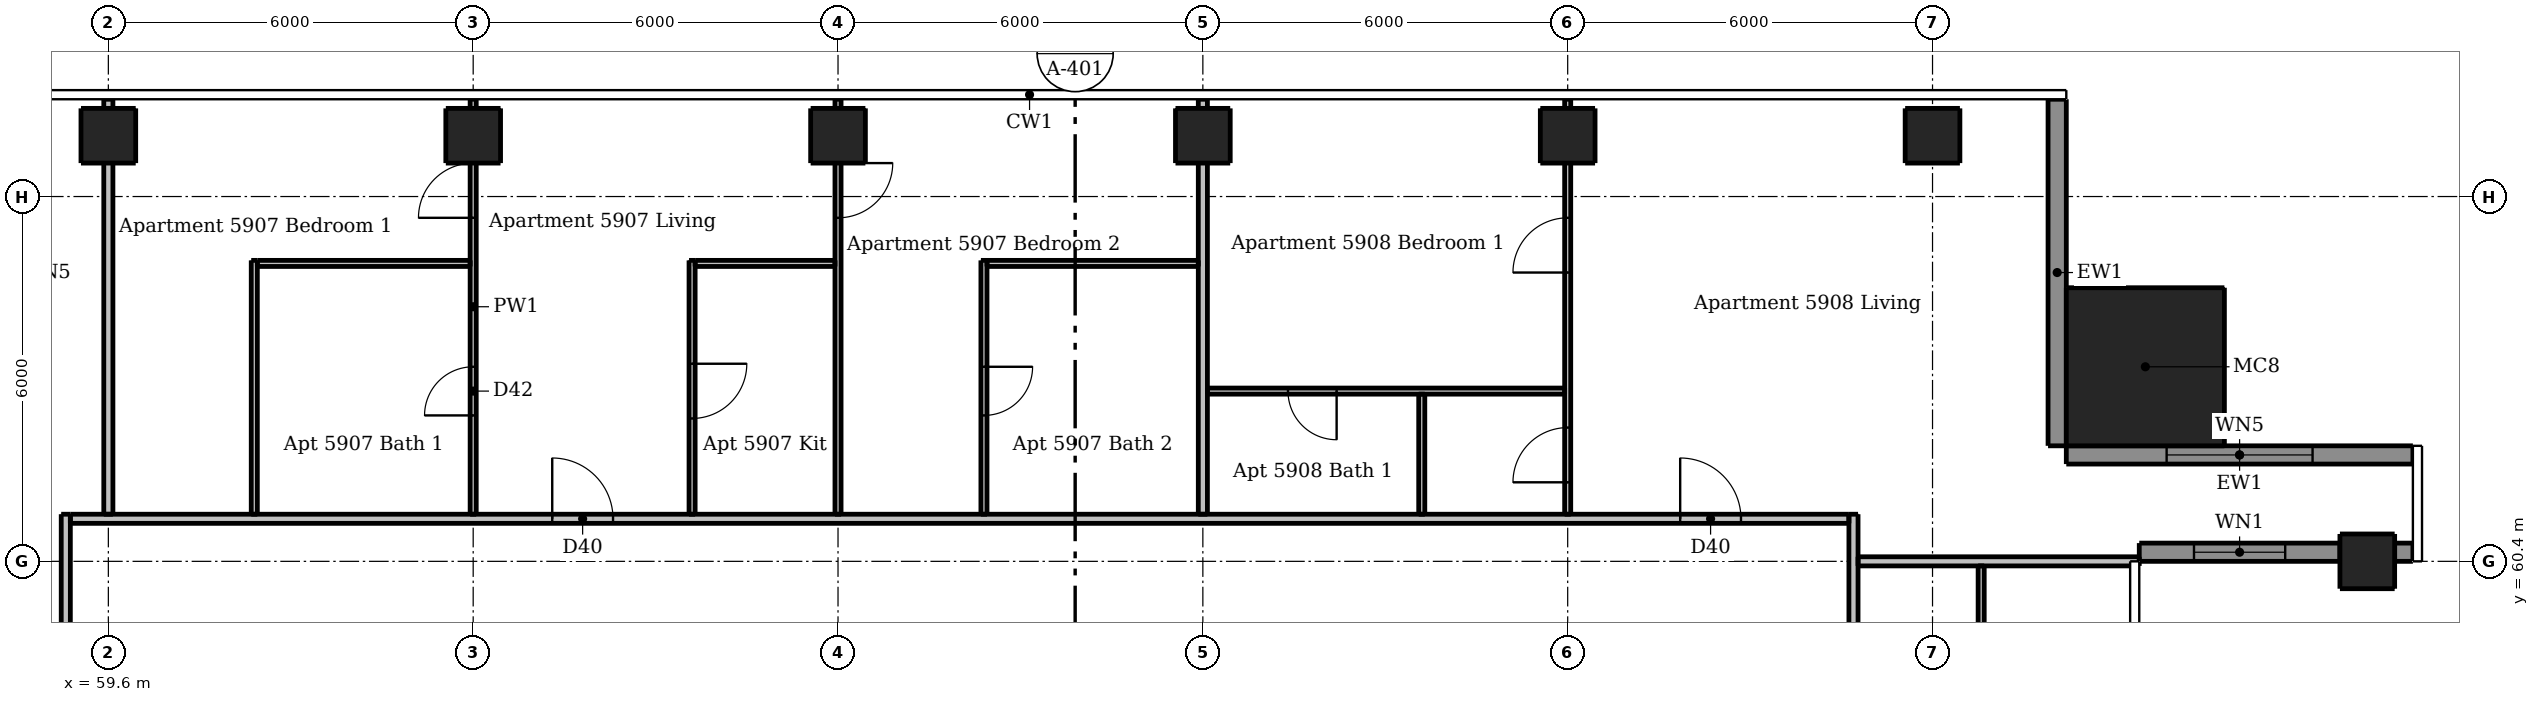
"""IFC4 building model, lengths in metres.
Left out: names, types, materials, properties, quantities, classifications, styles, units other than length and angle.
Written with IfcOpenShell. Run it as: python <this file> out.ifc"""

import sys

from ifc_helpers import new_model, si_unit, direction, frame, frame_2d, origin, origin_2d, place, context, subcontext, project, spatial, rectangle, extrude, element, fill, save


model = new_model("IFC4")
c1 = context("Model", 3, precision=1e-05, world=origin(), true_north=direction((0.0, 1.0)))
c2 = subcontext(c1, "Body", "Model", "MODEL_VIEW")
j1 = project(units=[si_unit("LENGTHUNIT", "METRE"), si_unit("PLANEANGLEUNIT", "RADIAN")], contexts=[c1])
p1 = place(None, origin())
s1 = spatial("IfcSite", under=j1, at=p1, CompositionType="ELEMENT")
p2 = place(p1, origin())
s2 = spatial("IfcBuilding", under=s1, at=p2, CompositionType="ELEMENT")
p3 = place(p2, frame((0.0, 0.0, 220.0)))
s3 = spatial("IfcBuildingStorey", under=s2, at=p3, CompositionType="ELEMENT", Elevation=220.0)
for number, where, z_axis, x_axis in (
    (1, (96.75, 60.4, 0.0), (0.0, 0.0, 1.0), (1.0, 0.0, 0.0)),
    (2, (59.6, 67.4, 0.0), (0.0, 0.0, 1.0), (1.0, 0.0, 0.0)),
    (3, (65.6, 67.4, 0.0), (0.0, 0.0, 1.0), (1.0, 0.0, 0.0)),
    (4, (71.6, 67.4, 0.0), (0.0, 0.0, 1.0), (1.0, 0.0, 0.0)),
    (5, (77.6, 67.4, 0.0), (0.0, 0.0, 1.0), (1.0, 0.0, 0.0)),
    (6, (83.6, 67.4, 0.0), (0.0, 0.0, 1.0), (1.0, 0.0, 0.0)),
    (7, (89.6, 67.4, 0.0), (0.0, 0.0, 1.0), (1.0, 0.0, 0.0)),
):
    element("IfcColumn", number, at=place(p3, frame(where, z_axis=z_axis, x_axis=x_axis)), inside=s3, PredefinedType="COLUMN", context=c2, shape_type="SweptSolid", body=[
        extrude(rectangle(XDim=0.9, YDim=0.9, at=origin_2d()), origin(), (0.0, 0.0, 1.0), 3.05),
    ])
p4 = place(p3, frame((93.1, 63.6, 0.0), z_axis=(0.0, 0.0, 1.0), x_axis=(1.0, 0.0, 0.0)))
e8 = element("IfcColumn", 8, at=p4, inside=s3, PredefinedType="COLUMN", context=c2, shape_type="SweptSolid", body=[
    extrude(rectangle(XDim=2.6, YDim=2.6, at=origin_2d()), origin(), (0.0, 0.0, 1.0), 3.3),
])
p5 = place(p3, frame((93.0, 60.55, 0.0), z_axis=(0.0, 0.0, 1.0), x_axis=(1.0, 0.0, 0.0)))
e9 = element("IfcWall", 9, at=p5, inside=s3, PredefinedType="SOLIDWALL", context=c2, shape_type="SweptSolid", body=[
    extrude(rectangle(XDim=3.3, YDim=0.3, at=frame_2d((1.65, 0.0))), origin(), (0.0, 0.0, 1.0), 3.05),
])
p6 = place(p5, frame((0.9, 0.0, 0.9)))
e10 = element("IfcOpeningElement", 10, at=p6, cuts=e9, PredefinedType="OPENING", context=c2, shape_type="SweptSolid", body=[
    extrude(rectangle(XDim=1.5, YDim=1.5, at=frame_2d((0.75, 0.75))), frame((0.0, 0.16, 0.0), z_axis=(0.0, -1.0, 0.0), x_axis=(1.0, 0.0, 0.0)), (0.0, 0.0, 1.0), 0.32),
])
p7 = place(p3, frame((97.2, 60.55, 0.0), z_axis=(0.0, 0.0, 1.0), x_axis=(1.0, 0.0, 0.0)))
e11 = element("IfcWall", 11, at=p7, inside=s3, PredefinedType="SOLIDWALL", context=c2, shape_type="SweptSolid", body=[
    extrude(rectangle(XDim=0.3, YDim=0.3, at=frame_2d((0.15, 0.0))), origin(), (0.0, 0.0, 1.0), 3.05),
])
p8 = place(p3, frame((97.5, 62.15, 0.0), z_axis=(0.0, 0.0, 1.0), x_axis=(-1.0, 0.0, 0.0)))
e12 = element("IfcWall", 12, at=p8, inside=s3, PredefinedType="SOLIDWALL", context=c2, shape_type="SweptSolid", body=[
    extrude(rectangle(XDim=5.7, YDim=0.3, at=frame_2d((2.85, 0.0))), origin(), (0.0, 0.0, 1.0), 3.05),
])
p9 = place(p8, frame((1.65, 0.0, 0.15)))
e13 = element("IfcOpeningElement", 13, at=p9, cuts=e12, PredefinedType="OPENING", context=c2, shape_type="SweptSolid", body=[
    extrude(rectangle(XDim=2.4, YDim=2.1, at=frame_2d((1.2, 1.05))), frame((0.0, 0.16, 0.0), z_axis=(0.0, -1.0, 0.0), x_axis=(1.0, 0.0, 0.0)), (0.0, 0.0, 1.0), 0.32),
])
p10 = place(p3, frame((91.65, 62.3, 0.0), z_axis=(0.0, 0.0, 1.0), x_axis=(0.0, 1.0, 0.0)))
e14 = element("IfcWall", 14, at=p10, inside=s3, PredefinedType="SOLIDWALL", context=c2, shape_type="SweptSolid", body=[
    extrude(rectangle(XDim=5.7, YDim=0.3, at=frame_2d((2.85, 0.0))), origin(), (0.0, 0.0, 1.0), 3.05),
])
p11 = place(p3, frame((62.0, 61.175, 0.0), z_axis=(0.0, 0.0, 1.0), x_axis=(0.0, 1.0, 0.0)))
e15 = element("IfcWall", 15, at=p11, inside=s3, PredefinedType="PARTITIONING", context=c2, shape_type="SweptSolid", body=[
    extrude(rectangle(XDim=4.175, YDim=0.1, at=frame_2d((2.087, 0.0))), origin(), (0.0, 0.0, 1.0), 3.05),
])
p12 = place(p3, frame((65.6, 61.175, 0.0), z_axis=(0.0, 0.0, 1.0), x_axis=(0.0, 1.0, 0.0)))
e16 = element("IfcWall", 16, at=p12, inside=s3, PredefinedType="PARTITIONING", context=c2, shape_type="SweptSolid", body=[
    extrude(rectangle(XDim=6.825, YDim=0.1, at=frame_2d((3.413, 0.0))), origin(), (0.0, 0.0, 1.0), 2.516),
])
p13 = place(p12, frame((4.875, 0.0, 0.0)))
e17 = element("IfcOpeningElement", 17, at=p13, cuts=e16, PredefinedType="OPENING", context=c2, shape_type="SweptSolid", body=[
    extrude(rectangle(XDim=0.9, YDim=2.1, at=frame_2d((0.45, 1.05))), frame((0.0, 0.06, 0.0), z_axis=(0.0, -1.0, 0.0), x_axis=(1.0, 0.0, 0.0)), (0.0, 0.0, 1.0), 0.12),
])
p14 = place(p12, frame((1.625, 0.0, 0.0)))
e18 = element("IfcOpeningElement", 18, at=p14, cuts=e16, PredefinedType="OPENING", context=c2, shape_type="SweptSolid", body=[
    extrude(rectangle(XDim=0.8, YDim=2.1, at=frame_2d((0.4, 1.05))), frame((0.0, 0.06, 0.0), z_axis=(0.0, -1.0, 0.0), x_axis=(1.0, 0.0, 0.0)), (0.0, 0.0, 1.0), 0.12),
])
p15 = place(p3, frame((69.2, 65.35, 0.0), z_axis=(0.0, 0.0, 1.0), x_axis=(0.0, -1.0, 0.0)))
e19 = element("IfcWall", 19, at=p15, inside=s3, PredefinedType="PARTITIONING", context=c2, shape_type="SweptSolid", body=[
    extrude(rectangle(XDim=4.175, YDim=0.1, at=frame_2d((2.087, 0.0))), origin(), (0.0, 0.0, 1.0), 3.05),
])
p16 = place(p15, frame((1.7, 0.0, 0.0)))
e20 = element("IfcOpeningElement", 20, at=p16, cuts=e19, PredefinedType="OPENING", context=c2, shape_type="SweptSolid", body=[
    extrude(rectangle(XDim=0.9, YDim=2.1, at=frame_2d((0.45, 1.05))), frame((0.0, 0.06, 0.0), z_axis=(0.0, -1.0, 0.0), x_axis=(1.0, 0.0, 0.0)), (0.0, 0.0, 1.0), 0.12),
])
p17 = place(p3, frame((71.6, 68.0, 0.0), z_axis=(0.0, 0.0, 1.0), x_axis=(0.0, -1.0, 0.0)))
e21 = element("IfcWall", 21, at=p17, inside=s3, PredefinedType="PARTITIONING", context=c2, shape_type="SweptSolid", body=[
    extrude(rectangle(XDim=6.825, YDim=0.1, at=frame_2d((3.413, 0.0))), origin(), (0.0, 0.0, 1.0), 2.516),
])
p18 = place(p17, frame((1.05, 0.0, 0.0)))
e22 = element("IfcOpeningElement", 22, at=p18, cuts=e21, PredefinedType="OPENING", context=c2, shape_type="SweptSolid", body=[
    extrude(rectangle(XDim=0.9, YDim=2.1, at=frame_2d((0.45, 1.05))), frame((0.0, 0.06, 0.0), z_axis=(0.0, -1.0, 0.0), x_axis=(1.0, 0.0, 0.0)), (0.0, 0.0, 1.0), 0.12),
])
p19 = place(p3, frame((74.0, 65.35, 0.0), z_axis=(0.0, 0.0, 1.0), x_axis=(0.0, -1.0, 0.0)))
e23 = element("IfcWall", 23, at=p19, inside=s3, PredefinedType="PARTITIONING", context=c2, shape_type="SweptSolid", body=[
    extrude(rectangle(XDim=4.175, YDim=0.1, at=frame_2d((2.087, 0.0))), origin(), (0.0, 0.0, 1.0), 3.05),
])
p20 = place(p19, frame((1.75, 0.0, 0.0)))
e24 = element("IfcOpeningElement", 24, at=p20, cuts=e23, PredefinedType="OPENING", context=c2, shape_type="SweptSolid", body=[
    extrude(rectangle(XDim=0.8, YDim=2.1, at=frame_2d((0.4, 1.05))), frame((0.0, 0.06, 0.0), z_axis=(0.0, -1.0, 0.0), x_axis=(1.0, 0.0, 0.0)), (0.0, 0.0, 1.0), 0.12),
])
p21 = place(p3, frame((81.2, 61.175, 0.0), z_axis=(0.0, 0.0, 1.0), x_axis=(0.0, 1.0, 0.0)))
e25 = element("IfcWall", 25, at=p21, inside=s3, PredefinedType="PARTITIONING", context=c2, shape_type="SweptSolid", body=[
    extrude(rectangle(XDim=1.975, YDim=0.1, at=frame_2d((0.987, 0.0))), origin(), (0.0, 0.0, 1.0), 3.05),
])
p22 = place(p3, frame((83.6, 61.175, 0.0), z_axis=(0.0, 0.0, 1.0), x_axis=(0.0, 1.0, 0.0)))
e26 = element("IfcWall", 26, at=p22, inside=s3, PredefinedType="PARTITIONING", context=c2, shape_type="SweptSolid", body=[
    extrude(rectangle(XDim=6.825, YDim=0.1, at=frame_2d((3.413, 0.0))), origin(), (0.0, 0.0, 1.0), 2.516),
])
p23 = place(p22, frame((0.525, 0.0, 0.0)))
e27 = element("IfcOpeningElement", 27, at=p23, cuts=e26, PredefinedType="OPENING", context=c2, shape_type="SweptSolid", body=[
    extrude(rectangle(XDim=0.9, YDim=2.1, at=frame_2d((0.45, 1.05))), frame((0.0, 0.06, 0.0), z_axis=(0.0, -1.0, 0.0), x_axis=(1.0, 0.0, 0.0)), (0.0, 0.0, 1.0), 0.12),
])
p24 = place(p22, frame((3.975, 0.0, 0.0)))
e28 = element("IfcOpeningElement", 28, at=p24, cuts=e26, PredefinedType="OPENING", context=c2, shape_type="SweptSolid", body=[
    extrude(rectangle(XDim=0.9, YDim=2.1, at=frame_2d((0.45, 1.05))), frame((0.0, 0.06, 0.0), z_axis=(0.0, -1.0, 0.0), x_axis=(1.0, 0.0, 0.0)), (0.0, 0.0, 1.0), 0.12),
])
p25 = place(p3, frame((90.4, 57.45, 0.0), z_axis=(0.0, 0.0, 1.0), x_axis=(0.0, 1.0, 0.0)))
e29 = element("IfcWall", 29, at=p25, inside=s3, PredefinedType="PARTITIONING", context=c2, shape_type="SweptSolid", body=[
    extrude(rectangle(XDim=2.875, YDim=0.1, at=frame_2d((1.438, 0.0))), origin(), (0.0, 0.0, 1.0), 3.05),
])
p26 = place(p3, frame((62.05, 65.3, 0.0), z_axis=(0.0, 0.0, 1.0), x_axis=(1.0, 0.0, 0.0)))
e30 = element("IfcWall", 30, at=p26, inside=s3, PredefinedType="PARTITIONING", context=c2, shape_type="SweptSolid", body=[
    extrude(rectangle(XDim=3.5, YDim=0.1, at=frame_2d((1.75, 0.0))), origin(), (0.0, 0.0, 1.0), 3.05),
])
p27 = place(p3, frame((69.25, 65.3, 0.0), z_axis=(0.0, 0.0, 1.0), x_axis=(1.0, 0.0, 0.0)))
e31 = element("IfcWall", 31, at=p27, inside=s3, PredefinedType="PARTITIONING", context=c2, shape_type="SweptSolid", body=[
    extrude(rectangle(XDim=2.3, YDim=0.1, at=frame_2d((1.15, 0.0))), origin(), (0.0, 0.0, 1.0), 3.05),
])
p28 = place(p3, frame((74.05, 65.3, 0.0), z_axis=(0.0, 0.0, 1.0), x_axis=(1.0, 0.0, 0.0)))
e32 = element("IfcWall", 32, at=p28, inside=s3, PredefinedType="PARTITIONING", context=c2, shape_type="SweptSolid", body=[
    extrude(rectangle(XDim=3.475, YDim=0.1, at=frame_2d((1.737, 0.0))), origin(), (0.0, 0.0, 1.0), 3.05),
])
p29 = place(p3, frame((83.55, 63.2, 0.0), z_axis=(0.0, 0.0, 1.0), x_axis=(-1.0, 0.0, 0.0)))
e33 = element("IfcWall", 33, at=p29, inside=s3, PredefinedType="PARTITIONING", context=c2, shape_type="SweptSolid", body=[
    extrude(rectangle(XDim=5.875, YDim=0.1, at=frame_2d((2.938, 0.0))), origin(), (0.0, 0.0, 1.0), 3.05),
])
p30 = place(p29, frame((3.75, 0.0, 0.0)))
e34 = element("IfcOpeningElement", 34, at=p30, cuts=e33, PredefinedType="OPENING", context=c2, shape_type="SweptSolid", body=[
    extrude(rectangle(XDim=0.8, YDim=2.1, at=frame_2d((0.4, 1.05))), frame((0.0, 0.06, 0.0), z_axis=(0.0, -1.0, 0.0), x_axis=(1.0, 0.0, 0.0)), (0.0, 0.0, 1.0), 0.12),
])
p31 = place(p3, frame((58.9, 30.325, 0.0), z_axis=(0.0, 0.0, 1.0), x_axis=(0.0, 1.0, 0.0)))
e35 = element("IfcWall", 35, at=p31, inside=s3, PredefinedType="PARTITIONING", context=c2, shape_type="SweptSolid", body=[
    extrude(rectangle(XDim=30.85, YDim=0.15, at=frame_2d((15.425, 0.0))), origin(), (0.0, 0.0, 1.0), 3.05),
])
p32 = place(p31, frame((7.375, 0.0, 0.0)))
e36 = element("IfcOpeningElement", 36, at=p32, cuts=e35, PredefinedType="OPENING", context=c2, shape_type="SweptSolid", body=[
    extrude(rectangle(XDim=1.0, YDim=2.1, at=frame_2d((0.5, 1.05))), frame((0.0, 0.085, 0.0), z_axis=(0.0, -1.0, 0.0), x_axis=(1.0, 0.0, 0.0)), (0.0, 0.0, 1.0), 0.17),
])
p33 = place(p31, frame((26.925, 0.0, 0.0)))
e37 = element("IfcOpeningElement", 37, at=p33, cuts=e35, PredefinedType="OPENING", context=c2, shape_type="SweptSolid", body=[
    extrude(rectangle(XDim=1.0, YDim=2.1, at=frame_2d((0.5, 1.05))), frame((0.0, 0.085, 0.0), z_axis=(0.0, -1.0, 0.0), x_axis=(1.0, 0.0, 0.0)), (0.0, 0.0, 1.0), 0.17),
])
p34 = place(p3, frame((59.6, 61.175, 0.0), z_axis=(0.0, 0.0, 1.0), x_axis=(0.0, 1.0, 0.0)))
e38 = element("IfcWall", 38, at=p34, inside=s3, PredefinedType="PARTITIONING", context=c2, shape_type="SweptSolid", body=[
    extrude(rectangle(XDim=6.825, YDim=0.15, at=frame_2d((3.413, 0.0))), origin(), (0.0, 0.0, 1.0), 2.51),
])
p35 = place(p3, frame((77.6, 61.175, 0.0), z_axis=(0.0, 0.0, 1.0), x_axis=(0.0, 1.0, 0.0)))
e39 = element("IfcWall", 39, at=p35, inside=s3, PredefinedType="PARTITIONING", context=c2, shape_type="SweptSolid", body=[
    extrude(rectangle(XDim=6.825, YDim=0.15, at=frame_2d((3.413, 0.0))), origin(), (0.0, 0.0, 1.0), 2.516),
])
p36 = place(p3, frame((88.3, 61.175, 0.0), z_axis=(0.0, 0.0, 1.0), x_axis=(0.0, -1.0, 0.0)))
e40 = element("IfcWall", 40, at=p36, inside=s3, PredefinedType="PARTITIONING", context=c2, shape_type="SweptSolid", body=[
    extrude(rectangle(XDim=29.4, YDim=0.15, at=frame_2d((14.7, 0.0))), origin(), (0.0, 0.0, 1.0), 3.05),
])
p37 = place(p36, frame((28.125, 0.0, 0.0)))
e41 = element("IfcOpeningElement", 41, at=p37, cuts=e40, PredefinedType="OPENING", context=c2, shape_type="SweptSolid", body=[
    extrude(rectangle(XDim=1.0, YDim=2.1, at=frame_2d((0.5, 1.05))), frame((0.0, 0.085, 0.0), z_axis=(0.0, -1.0, 0.0), x_axis=(1.0, 0.0, 0.0)), (0.0, 0.0, 1.0), 0.17),
])
p38 = place(p36, frame((15.275, 0.0, 0.0)))
e42 = element("IfcOpeningElement", 42, at=p38, cuts=e40, PredefinedType="OPENING", context=c2, shape_type="SweptSolid", body=[
    extrude(rectangle(XDim=1.0, YDim=2.1, at=frame_2d((0.5, 1.05))), frame((0.0, 0.085, 0.0), z_axis=(0.0, -1.0, 0.0), x_axis=(1.0, 0.0, 0.0)), (0.0, 0.0, 1.0), 0.17),
])
p39 = place(p36, frame((5.075, 0.0, 0.0)))
e43 = element("IfcOpeningElement", 43, at=p39, cuts=e40, PredefinedType="OPENING", context=c2, shape_type="SweptSolid", body=[
    extrude(rectangle(XDim=1.0, YDim=2.1, at=frame_2d((0.5, 1.05))), frame((0.0, 0.085, 0.0), z_axis=(0.0, -1.0, 0.0), x_axis=(1.0, 0.0, 0.0)), (0.0, 0.0, 1.0), 0.17),
])
p40 = place(p3, frame((58.975, 61.1, 0.0), z_axis=(0.0, 0.0, 1.0), x_axis=(1.0, 0.0, 0.0)))
e44 = element("IfcWall", 44, at=p40, inside=s3, PredefinedType="PARTITIONING", context=c2, shape_type="SweptSolid", body=[
    extrude(rectangle(XDim=29.25, YDim=0.15, at=frame_2d((14.625, 0.0))), origin(), (0.0, 0.0, 1.0), 3.05),
])
p41 = place(p40, frame((7.925, 0.0, 0.0)))
e45 = element("IfcOpeningElement", 45, at=p41, cuts=e44, PredefinedType="OPENING", context=c2, shape_type="SweptSolid", body=[
    extrude(rectangle(XDim=1.0, YDim=2.1, at=frame_2d((0.5, 1.05))), frame((0.0, 0.085, 0.0), z_axis=(0.0, -1.0, 0.0), x_axis=(1.0, 0.0, 0.0)), (0.0, 0.0, 1.0), 0.17),
])
p42 = place(p40, frame((26.475, 0.0, 0.0)))
e46 = element("IfcOpeningElement", 46, at=p42, cuts=e44, PredefinedType="OPENING", context=c2, shape_type="SweptSolid", body=[
    extrude(rectangle(XDim=1.0, YDim=2.1, at=frame_2d((0.5, 1.05))), frame((0.0, 0.085, 0.0), z_axis=(0.0, -1.0, 0.0), x_axis=(1.0, 0.0, 0.0)), (0.0, 0.0, 1.0), 0.17),
])
p43 = place(p3, frame((88.375, 60.4, 0.0), z_axis=(0.0, 0.0, 1.0), x_axis=(1.0, 0.0, 0.0)))
e47 = element("IfcWall", 47, at=p43, inside=s3, PredefinedType="PARTITIONING", context=c2, shape_type="SweptSolid", body=[
    extrude(rectangle(XDim=4.625, YDim=0.15, at=frame_2d((2.312, 0.0))), origin(), (0.0, 0.0, 1.0), 2.59),
])
p44 = place(p6, origin())
e48 = element("IfcWindow", 48, at=p44, inside=s3, PartitioningType="DOUBLE_PANEL_VERTICAL", PredefinedType="WINDOW", context=c2, shape_type="SweptSolid", body=[
    extrude(rectangle(XDim=1.5, YDim=1.5, at=frame_2d((0.75, 0.75))), frame((0.0, 0.03, 0.0), z_axis=(0.0, -1.0, 0.0), x_axis=(1.0, 0.0, 0.0)), (0.0, 0.0, 1.0), 0.06),
])
fill(e10, e48)
p45 = place(p9, origin())
e49 = element("IfcWindow", 49, at=p45, inside=s3, PartitioningType="DOUBLE_PANEL_VERTICAL", PredefinedType="WINDOW", context=c2, shape_type="SweptSolid", body=[
    extrude(rectangle(XDim=2.4, YDim=2.1, at=frame_2d((1.2, 1.05))), frame((0.0, 0.03, 0.0), z_axis=(0.0, -1.0, 0.0), x_axis=(1.0, 0.0, 0.0)), (0.0, 0.0, 1.0), 0.06),
])
fill(e13, e49)
p46 = place(p41, origin())
e50 = element("IfcDoor", 50, at=p46, inside=s3, OperationType="SINGLE_SWING_LEFT", PredefinedType="DOOR", context=c2, shape_type="SweptSolid", body=[
    extrude(rectangle(XDim=1.0, YDim=2.1, at=frame_2d((0.5, 1.05))), frame((0.0, 0.025, 0.0), z_axis=(0.0, -1.0, 0.0), x_axis=(1.0, 0.0, 0.0)), (0.0, 0.0, 1.0), 0.05),
])
fill(e45, e50)
p47 = place(p16, origin())
e51 = element("IfcDoor", 51, at=p47, inside=s3, OperationType="SINGLE_SWING_LEFT", PredefinedType="DOOR", context=c2, shape_type="SweptSolid", body=[
    extrude(rectangle(XDim=0.9, YDim=2.1, at=frame_2d((0.45, 1.05))), frame((0.0, 0.025, 0.0), z_axis=(0.0, -1.0, 0.0), x_axis=(1.0, 0.0, 0.0)), (0.0, 0.0, 1.0), 0.05),
])
fill(e20, e51)
p48 = place(p13, origin())
e52 = element("IfcDoor", 52, at=p48, inside=s3, OperationType="SINGLE_SWING_LEFT", PredefinedType="DOOR", context=c2, shape_type="SweptSolid", body=[
    extrude(rectangle(XDim=0.9, YDim=2.1, at=frame_2d((0.45, 1.05))), frame((0.0, 0.025, 0.0), z_axis=(0.0, -1.0, 0.0), x_axis=(1.0, 0.0, 0.0)), (0.0, 0.0, 1.0), 0.05),
])
fill(e17, e52)
p49 = place(p14, origin())
e53 = element("IfcDoor", 53, at=p49, inside=s3, OperationType="SINGLE_SWING_LEFT", PredefinedType="DOOR", context=c2, shape_type="SweptSolid", body=[
    extrude(rectangle(XDim=0.8, YDim=2.1, at=frame_2d((0.4, 1.05))), frame((0.0, 0.025, 0.0), z_axis=(0.0, -1.0, 0.0), x_axis=(1.0, 0.0, 0.0)), (0.0, 0.0, 1.0), 0.05),
])
fill(e18, e53)
p50 = place(p18, origin())
e54 = element("IfcDoor", 54, at=p50, inside=s3, OperationType="SINGLE_SWING_LEFT", PredefinedType="DOOR", context=c2, shape_type="SweptSolid", body=[
    extrude(rectangle(XDim=0.9, YDim=2.1, at=frame_2d((0.45, 1.05))), frame((0.0, 0.025, 0.0), z_axis=(0.0, -1.0, 0.0), x_axis=(1.0, 0.0, 0.0)), (0.0, 0.0, 1.0), 0.05),
])
fill(e22, e54)
p51 = place(p20, origin())
e55 = element("IfcDoor", 55, at=p51, inside=s3, OperationType="SINGLE_SWING_LEFT", PredefinedType="DOOR", context=c2, shape_type="SweptSolid", body=[
    extrude(rectangle(XDim=0.8, YDim=2.1, at=frame_2d((0.4, 1.05))), frame((0.0, 0.025, 0.0), z_axis=(0.0, -1.0, 0.0), x_axis=(1.0, 0.0, 0.0)), (0.0, 0.0, 1.0), 0.05),
])
fill(e24, e55)
p52 = place(p42, origin())
e56 = element("IfcDoor", 56, at=p52, inside=s3, OperationType="SINGLE_SWING_LEFT", PredefinedType="DOOR", context=c2, shape_type="SweptSolid", body=[
    extrude(rectangle(XDim=1.0, YDim=2.1, at=frame_2d((0.5, 1.05))), frame((0.0, 0.025, 0.0), z_axis=(0.0, -1.0, 0.0), x_axis=(1.0, 0.0, 0.0)), (0.0, 0.0, 1.0), 0.05),
])
fill(e46, e56)
p53 = place(p23, origin())
e57 = element("IfcDoor", 57, at=p53, inside=s3, OperationType="SINGLE_SWING_LEFT", PredefinedType="DOOR", context=c2, shape_type="SweptSolid", body=[
    extrude(rectangle(XDim=0.9, YDim=2.1, at=frame_2d((0.45, 1.05))), frame((0.0, 0.025, 0.0), z_axis=(0.0, -1.0, 0.0), x_axis=(1.0, 0.0, 0.0)), (0.0, 0.0, 1.0), 0.05),
])
fill(e27, e57)
p54 = place(p24, origin())
e58 = element("IfcDoor", 58, at=p54, inside=s3, OperationType="SINGLE_SWING_LEFT", PredefinedType="DOOR", context=c2, shape_type="SweptSolid", body=[
    extrude(rectangle(XDim=0.9, YDim=2.1, at=frame_2d((0.45, 1.05))), frame((0.0, 0.025, 0.0), z_axis=(0.0, -1.0, 0.0), x_axis=(1.0, 0.0, 0.0)), (0.0, 0.0, 1.0), 0.05),
])
fill(e28, e58)
p55 = place(p30, origin())
e59 = element("IfcDoor", 59, at=p55, inside=s3, OperationType="SINGLE_SWING_LEFT", PredefinedType="DOOR", context=c2, shape_type="SweptSolid", body=[
    extrude(rectangle(XDim=0.8, YDim=2.1, at=frame_2d((0.4, 1.05))), frame((0.0, 0.025, 0.0), z_axis=(0.0, -1.0, 0.0), x_axis=(1.0, 0.0, 0.0)), (0.0, 0.0, 1.0), 0.05),
])
fill(e34, e59)
save(model, sys.argv[1])
